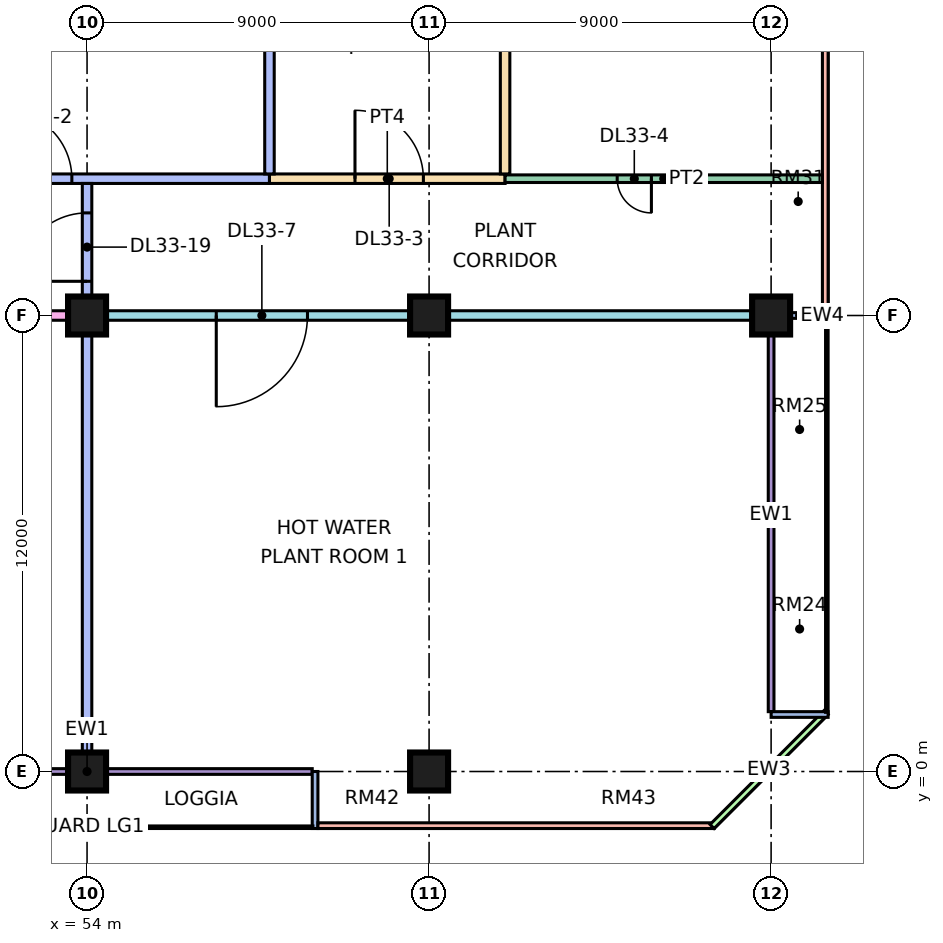
"""IFC4 building model, lengths in metres.
Left out: names, types, materials, properties, quantities, classifications, styles, units other than length and angle.
Written with IfcOpenShell. Run it as: python <this file> out.ifc"""

import sys

from ifc_helpers import new_model, si_unit, direction, frame, frame_2d, origin, origin_2d, place, context, subcontext, project, spatial, rectangle, extrude, element, fill, save


model = new_model("IFC4")
c1 = context("Model", 3, precision=1e-05, world=origin(), true_north=direction((0.0, 1.0)))
c2 = subcontext(c1, "Body", "Model", "MODEL_VIEW")
j1 = project(units=[si_unit("LENGTHUNIT", "METRE"), si_unit("PLANEANGLEUNIT", "RADIAN")], contexts=[c1])
p1 = place(None, origin())
s1 = spatial("IfcSite", under=j1, at=p1, CompositionType="ELEMENT")
p2 = place(p1, origin())
s2 = spatial("IfcBuilding", under=s1, at=p2, CompositionType="ELEMENT")
p3 = place(p2, frame((0.0, 0.0, 140.65)))
s3 = spatial("IfcBuildingStorey", under=s2, at=p3, CompositionType="ELEMENT", Elevation=140.65)
for number, where, z_axis, x_axis in (
    (1, (54.0, 0.0, 0.0), (0.0, 0.0, 1.0), (1.0, 0.0, 0.0)),
    (2, (54.0, 12.0, 0.0), (0.0, 0.0, 1.0), (1.0, 0.0, 0.0)),
    (3, (63.0, 0.0, 0.0), (0.0, 0.0, 1.0), (1.0, 0.0, 0.0)),
    (4, (63.0, 12.0, 0.0), (0.0, 0.0, 1.0), (1.0, 0.0, 0.0)),
    (5, (72.0, 12.0, 0.0), (0.0, 0.0, 1.0), (1.0, 0.0, 0.0)),
):
    element("IfcColumn", number, at=place(p3, frame(where, z_axis=z_axis, x_axis=x_axis)), inside=s3, PredefinedType="COLUMN", context=c2, shape_type="SweptSolid", body=[
        extrude(rectangle(XDim=1.0, YDim=1.0, at=origin_2d()), origin(), (0.0, 0.0, 1.0), 5.5),
    ])
p4 = place(p3, frame((48.075, 0.0, 0.0), z_axis=(0.0, 0.0, 1.0), x_axis=(1.0, 0.0, 0.0)))
e6 = element("IfcWall", 6, at=p4, inside=s3, PredefinedType="SOLIDWALL", context=c2, shape_type="SweptSolid", body=[
    extrude(rectangle(XDim=11.85, YDim=0.15, at=frame_2d((5.925, 0.0))), origin(), (0.0, 0.0, 1.0), 5.05),
])
p5 = place(p4, frame((1.163, 0.0, 0.45)))
e7 = element("IfcOpeningElement", 7, at=p5, cuts=e6, PredefinedType="OPENING", context=c2, shape_type="SweptSolid", body=[
    extrude(rectangle(XDim=3.0, YDim=3.6, at=frame_2d((1.5, 1.8))), frame((0.0, 0.085, 0.0), z_axis=(0.0, -1.0, 0.0), x_axis=(1.0, 0.0, 0.0)), (0.0, 0.0, 1.0), 0.17),
])
p6 = place(p3, frame((60.0, -1.5, 0.0), z_axis=(0.0, 0.0, 1.0), x_axis=(0.0, 1.0, 0.0)))
e8 = element("IfcWall", 8, at=p6, inside=s3, PredefinedType="SOLIDWALL", context=c2, shape_type="SweptSolid", body=[
    extrude(rectangle(XDim=1.5, YDim=0.15, at=frame_2d((0.75, 0.0))), origin(), (0.0, 0.0, 1.0), 5.05),
])
p7 = place(p3, frame((60.075, -1.425, 0.0), z_axis=(0.0, 0.0, 1.0), x_axis=(1.0, 0.0, 0.0)))
e9 = element("IfcWall", 9, at=p7, inside=s3, PredefinedType="SOLIDWALL", context=c2, shape_type="SweptSolid", body=[
    extrude(rectangle(XDim=10.425, YDim=0.15, at=frame_2d((5.212, 0.0))), origin(), (0.0, 0.0, 1.0), 5.05),
])
p8 = place(p3, frame((70.447, -1.447, 0.0), z_axis=(0.0, 0.0, 1.0), x_axis=(0.707106781187, 0.707106781187, 0.0)))
e10 = element("IfcWall", 10, at=p8, inside=s3, PredefinedType="SOLIDWALL", context=c2, shape_type="SweptSolid", body=[
    extrude(rectangle(XDim=4.243, YDim=0.15, at=frame_2d((2.121, 0.0))), origin(), (0.0, 0.0, 1.0), 5.05),
])
p9 = place(p3, frame((72.0, 1.575, 0.0), z_axis=(0.0, 0.0, 1.0), x_axis=(0.0, 1.0, 0.0)))
e11 = element("IfcWall", 11, at=p9, inside=s3, PredefinedType="SOLIDWALL", context=c2, shape_type="SweptSolid", body=[
    extrude(rectangle(XDim=10.35, YDim=0.15, at=frame_2d((5.175, 0.0))), origin(), (0.0, 0.0, 1.0), 5.05),
])
for number, where, z_axis, x_axis in (
    (12, (73.5, 1.5, 0.0), (0.0, 0.0, 1.0), (-1.0, 0.0, 0.0)),
    (13, (73.5, 12.0, 0.0), (0.0, 0.0, 1.0), (-1.0, 0.0, 0.0)),
):
    element("IfcWall", number, at=place(p3, frame(where, z_axis=z_axis, x_axis=x_axis)), inside=s3, PredefinedType="SOLIDWALL", context=c2, shape_type="SweptSolid", body=[
        extrude(rectangle(XDim=1.5, YDim=0.15, at=frame_2d((0.75, 0.0))), origin(), (0.0, 0.0, 1.0), 5.05),
    ])
p10 = place(p3, frame((73.425, 12.075, 0.0), z_axis=(0.0, 0.0, 1.0), x_axis=(0.0, 1.0, 0.0)))
e14 = element("IfcWall", 14, at=p10, inside=s3, PredefinedType="SOLIDWALL", context=c2, shape_type="SweptSolid", body=[
    extrude(rectangle(XDim=10.425, YDim=0.15, at=frame_2d((5.212, 0.0))), origin(), (0.0, 0.0, 1.0), 5.05),
])
p11 = place(p3, frame((40.65, 12.0, 0.0), z_axis=(0.0, 0.0, 1.0), x_axis=(1.0, 0.0, 0.0)))
e15 = element("IfcWall", 15, at=p11, inside=s3, PredefinedType="PARTITIONING", context=c2, shape_type="SweptSolid", body=[
    extrude(rectangle(XDim=13.225, YDim=0.25, at=frame_2d((6.613, 0.0))), origin(), (0.0, 0.0, 1.0), 2.45),
])
p12 = place(p11, frame((1.4, 0.0, 0.0)))
e16 = element("IfcOpeningElement", 16, at=p12, cuts=e15, PredefinedType="OPENING", context=c2, shape_type="SweptSolid", body=[
    extrude(rectangle(XDim=1.8, YDim=2.1, at=frame_2d((0.9, 1.05))), frame((0.0, 0.135, 0.0), z_axis=(0.0, -1.0, 0.0), x_axis=(1.0, 0.0, 0.0)), (0.0, 0.0, 1.0), 0.27),
])
p13 = place(p11, frame((7.75, 0.0, 0.0)))
e17 = element("IfcOpeningElement", 17, at=p13, cuts=e15, PredefinedType="OPENING", context=c2, shape_type="SweptSolid", body=[
    extrude(rectangle(XDim=2.4, YDim=2.1, at=frame_2d((1.2, 1.05))), frame((0.0, 0.135, 0.0), z_axis=(0.0, -1.0, 0.0), x_axis=(1.0, 0.0, 0.0)), (0.0, 0.0, 1.0), 0.27),
])
p14 = place(p3, frame((51.225, 15.6, 0.0), z_axis=(0.0, 0.0, 1.0), x_axis=(1.0, 0.0, 0.0)))
e18 = element("IfcWall", 18, at=p14, inside=s3, PredefinedType="PARTITIONING", context=c2, shape_type="SweptSolid", body=[
    extrude(rectangle(XDim=7.575, YDim=0.25, at=frame_2d((3.788, 0.0))), origin(), (0.0, 0.0, 1.0), 5.05),
])
p15 = place(p14, frame((0.575, 0.0, 0.0)))
e19 = element("IfcOpeningElement", 19, at=p15, cuts=e18, PredefinedType="OPENING", context=c2, shape_type="SweptSolid", body=[
    extrude(rectangle(XDim=1.8, YDim=2.1, at=frame_2d((0.9, 1.05))), frame((0.0, 0.135, 0.0), z_axis=(0.0, -1.0, 0.0), x_axis=(1.0, 0.0, 0.0)), (0.0, 0.0, 1.0), 0.27),
])
p16 = place(p3, frame((54.0, 0.074, 0.0), z_axis=(0.0, 0.0, 1.0), x_axis=(0.0, 1.0, 0.0)))
e20 = element("IfcWall", 20, at=p16, inside=s3, PredefinedType="PARTITIONING", context=c2, shape_type="SweptSolid", body=[
    extrude(rectangle(XDim=15.401, YDim=0.25, at=frame_2d((7.701, 0.0))), origin(), (0.0, 0.0, 1.0), 5.05),
])
p17 = place(p16, frame((12.826, 0.0, 0.0)))
e21 = element("IfcOpeningElement", 21, at=p17, cuts=e20, PredefinedType="OPENING", context=c2, shape_type="SweptSolid", body=[
    extrude(rectangle(XDim=1.8, YDim=2.1, at=frame_2d((0.9, 1.05))), frame((0.0, 0.135, 0.0), z_axis=(0.0, -1.0, 0.0), x_axis=(1.0, 0.0, 0.0)), (0.0, 0.0, 1.0), 0.27),
])
p18 = place(p3, frame((54.125, 12.0, 0.0), z_axis=(0.0, 0.0, 1.0), x_axis=(1.0, 0.0, 0.0)))
e22 = element("IfcWall", 22, at=p18, inside=s3, PredefinedType="PARTITIONING", context=c2, shape_type="SweptSolid", body=[
    extrude(rectangle(XDim=17.875, YDim=0.25, at=frame_2d((8.938, 0.0))), origin(), (0.0, 0.0, 1.0), 2.45),
])
p19 = place(p18, frame((3.275, 0.0, 0.0)))
e23 = element("IfcOpeningElement", 23, at=p19, cuts=e22, PredefinedType="OPENING", context=c2, shape_type="SweptSolid", body=[
    extrude(rectangle(XDim=2.4, YDim=2.1, at=frame_2d((1.2, 1.05))), frame((0.0, 0.135, 0.0), z_axis=(0.0, -1.0, 0.0), x_axis=(1.0, 0.0, 0.0)), (0.0, 0.0, 1.0), 0.27),
])
p20 = place(p3, frame((58.8, 15.6, 0.0), z_axis=(0.0, 0.0, 1.0), x_axis=(1.0, 0.0, 0.0)))
e24 = element("IfcWall", 24, at=p20, inside=s3, PredefinedType="PARTITIONING", context=c2, shape_type="SweptSolid", body=[
    extrude(rectangle(XDim=6.2, YDim=0.25, at=frame_2d((3.1, 0.0))), origin(), (0.0, 0.0, 1.0), 5.05),
])
p21 = place(p20, frame((2.25, 0.0, 0.0)))
e25 = element("IfcOpeningElement", 25, at=p21, cuts=e24, PredefinedType="OPENING", context=c2, shape_type="SweptSolid", body=[
    extrude(rectangle(XDim=1.8, YDim=2.1, at=frame_2d((0.9, 1.05))), frame((0.0, 0.135, 0.0), z_axis=(0.0, -1.0, 0.0), x_axis=(1.0, 0.0, 0.0)), (0.0, 0.0, 1.0), 0.27),
])
p22 = place(p3, frame((58.8, 15.725, 0.0), z_axis=(0.0, 0.0, 1.0), x_axis=(0.0, 1.0, 0.0)))
e26 = element("IfcWall", 26, at=p22, inside=s3, PredefinedType="PARTITIONING", context=c2, shape_type="SweptSolid", body=[
    extrude(rectangle(XDim=8.201, YDim=0.25, at=frame_2d((4.101, 0.0))), origin(), (0.0, 0.0, 1.0), 5.05),
])
p23 = place(p3, frame((65.0, 15.6, 0.0), z_axis=(0.0, 0.0, 1.0), x_axis=(1.0, 0.0, 0.0)))
e27 = element("IfcWall", 27, at=p23, inside=s3, PredefinedType="PARTITIONING", context=c2, shape_type="SweptSolid", body=[
    extrude(rectangle(XDim=8.35, YDim=0.2, at=frame_2d((4.175, 0.0))), origin(), (0.0, 0.0, 1.0), 5.05),
])
p24 = place(p23, frame((2.95, 0.0, 0.0)))
e28 = element("IfcOpeningElement", 28, at=p24, cuts=e27, PredefinedType="OPENING", context=c2, shape_type="SweptSolid", body=[
    extrude(rectangle(XDim=0.9, YDim=2.1, at=frame_2d((0.45, 1.05))), frame((0.0, 0.11, 0.0), z_axis=(0.0, -1.0, 0.0), x_axis=(1.0, 0.0, 0.0)), (0.0, 0.0, 1.0), 0.22),
])
p25 = place(p3, frame((65.0, 15.725, 0.0), z_axis=(0.0, 0.0, 1.0), x_axis=(0.0, 1.0, 0.0)))
e29 = element("IfcWall", 29, at=p25, inside=s3, PredefinedType="PARTITIONING", context=c2, shape_type="SweptSolid", body=[
    extrude(rectangle(XDim=9.625, YDim=0.25, at=frame_2d((4.812, 0.0))), origin(), (0.0, 0.0, 1.0), 5.05),
])
p26 = place(p15, origin())
e30 = element("IfcDoor", 30, at=p26, inside=s3, OperationType="DOUBLE_DOOR_SINGLE_SWING", PredefinedType="DOOR", context=c2, shape_type="SweptSolid", body=[
    extrude(rectangle(XDim=1.8, YDim=2.1, at=frame_2d((0.9, 1.05))), frame((0.0, 0.025, 0.0), z_axis=(0.0, -1.0, 0.0), x_axis=(1.0, 0.0, 0.0)), (0.0, 0.0, 1.0), 0.05),
])
fill(e19, e30)
p27 = place(p21, origin())
e31 = element("IfcDoor", 31, at=p27, inside=s3, OperationType="DOUBLE_DOOR_SINGLE_SWING", PredefinedType="DOOR", context=c2, shape_type="SweptSolid", body=[
    extrude(rectangle(XDim=1.8, YDim=2.1, at=frame_2d((0.9, 1.05))), frame((0.0, 0.025, 0.0), z_axis=(0.0, -1.0, 0.0), x_axis=(1.0, 0.0, 0.0)), (0.0, 0.0, 1.0), 0.05),
])
fill(e25, e31)
p28 = place(p24, origin())
e32 = element("IfcDoor", 32, at=p28, inside=s3, OperationType="SINGLE_SWING_RIGHT", PredefinedType="DOOR", context=c2, shape_type="SweptSolid", body=[
    extrude(rectangle(XDim=0.9, YDim=2.1, at=frame_2d((0.45, 1.05))), frame((0.0, 0.025, 0.0), z_axis=(0.0, -1.0, 0.0), x_axis=(1.0, 0.0, 0.0)), (0.0, 0.0, 1.0), 0.05),
])
fill(e28, e32)
p29 = place(p19, frame((2.4, 0.0, 0.0), z_axis=(0.0, 0.0, 1.0), x_axis=(-1.0, 0.0, 0.0)))
e33 = element("IfcDoor", 33, at=p29, inside=s3, OperationType="DOUBLE_DOOR_SINGLE_SWING", PredefinedType="DOOR", context=c2, shape_type="SweptSolid", body=[
    extrude(rectangle(XDim=2.4, YDim=2.1, at=frame_2d((1.2, 1.05))), frame((0.0, 0.025, 0.0), z_axis=(0.0, -1.0, 0.0), x_axis=(1.0, 0.0, 0.0)), (0.0, 0.0, 1.0), 0.05),
])
fill(e23, e33)
p30 = place(p17, origin())
e34 = element("IfcDoor", 34, at=p30, inside=s3, OperationType="DOUBLE_DOOR_SINGLE_SWING", PredefinedType="DOOR", context=c2, shape_type="SweptSolid", body=[
    extrude(rectangle(XDim=1.8, YDim=2.1, at=frame_2d((0.9, 1.05))), frame((0.0, 0.025, 0.0), z_axis=(0.0, -1.0, 0.0), x_axis=(1.0, 0.0, 0.0)), (0.0, 0.0, 1.0), 0.05),
])
fill(e21, e34)
save(model, sys.argv[1])
